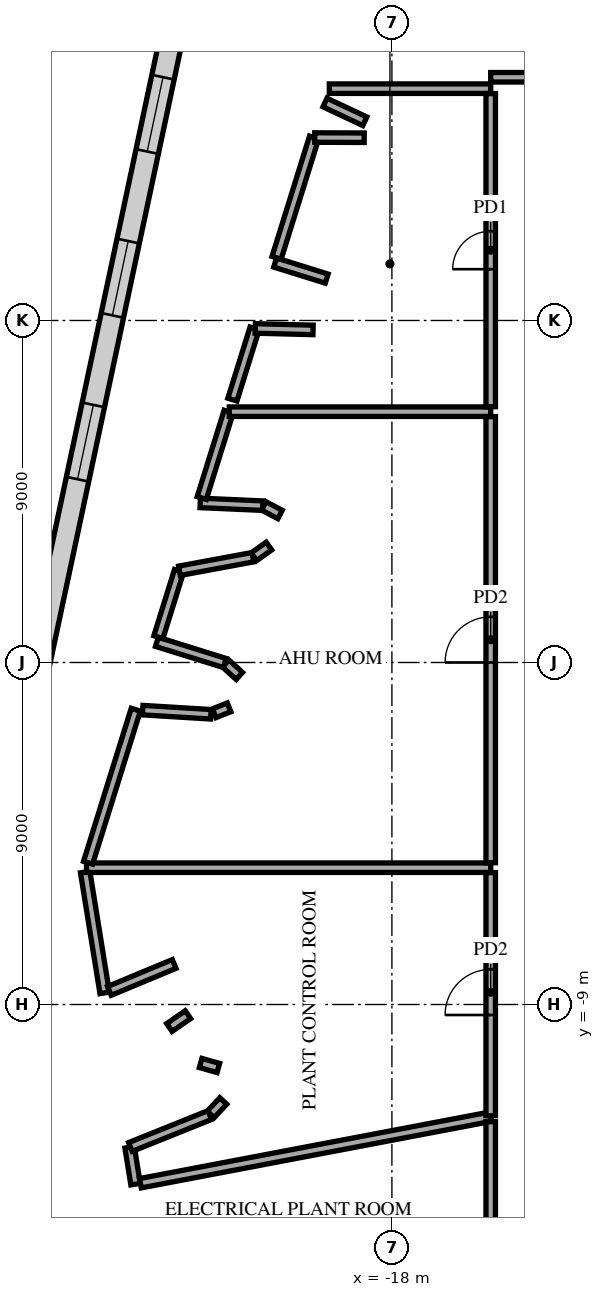
"""IFC4 building model, lengths in metres.
Left out: names, types, materials, properties, quantities, classifications, styles, units other than length and angle.
Written with IfcOpenShell. Run it as: python <this file> out.ifc"""

import sys

from ifc_helpers import new_model, si_unit, direction, frame, frame_2d, origin, place, context, subcontext, project, spatial, rectangle, extrude, element, fill, save


model = new_model("IFC4")
c1 = context("Model", 3, precision=1e-05, world=origin(), true_north=direction((0.0, 1.0)))
c2 = subcontext(c1, "Body", "Model", "MODEL_VIEW")
j1 = project(units=[si_unit("LENGTHUNIT", "METRE"), si_unit("PLANEANGLEUNIT", "RADIAN")], contexts=[c1])
p1 = place(None, origin())
s1 = spatial("IfcSite", under=j1, at=p1, CompositionType="ELEMENT")
p2 = place(p1, origin())
s2 = spatial("IfcBuilding", under=s1, at=p2, CompositionType="ELEMENT")
p3 = place(p2, frame((0.0, 0.0, 344.5)))
s3 = spatial("IfcBuildingStorey", under=s2, at=p3, CompositionType="ELEMENT", Elevation=344.5)
p4 = place(p3, frame((-24.902, -12.758, 0.0), z_axis=(0.0, 0.0, 1.0), x_axis=(0.159396618474, -0.987214626117, 0.0)))
e1 = element("IfcWall", 1, at=p4, inside=s3, PredefinedType="PARTITIONING", context=c2, shape_type="SweptSolid", body=[
    extrude(rectangle(XDim=0.982, YDim=0.25, at=frame_2d((0.491, 0.0))), origin(), (0.0, 0.0, 1.0), 5.3),
])
p5 = place(p3, frame((-24.881, -12.75, 0.0), z_axis=(0.0, 0.0, 1.0), x_axis=(0.927757135896, 0.373184534505, 0.0)))
e2 = element("IfcWall", 2, at=p5, inside=s3, PredefinedType="PARTITIONING", context=c2, shape_type="SweptSolid", body=[
    extrude(rectangle(XDim=2.252, YDim=0.25, at=frame_2d((1.126, 0.0))), origin(), (0.0, 0.0, 1.0), 5.3),
])
p6 = place(p3, frame((-24.617, -13.703, 0.0), z_axis=(0.0, 0.0, 1.0), x_axis=(0.982426598923, 0.186649344301, 0.0)))
e3 = element("IfcWall", 3, at=p6, inside=s3, PredefinedType="PARTITIONING", context=c2, shape_type="SweptSolid", body=[
    extrude(rectangle(XDim=9.382, YDim=0.25, at=frame_2d((4.691, 0.0))), origin(), (0.0, 0.0, 1.0), 4.466),
])
p7 = place(p3, frame((-15.4, -15.27, 0.0), z_axis=(0.0, 0.0, 1.0), x_axis=(0.0, 1.0, 0.0)))
e4 = element("IfcWall", 4, at=p7, inside=s3, PredefinedType="PARTITIONING", context=c2, shape_type="SweptSolid", body=[
    extrude(rectangle(XDim=3.186, YDim=0.25, at=frame_2d((1.593, 0.0))), origin(), (0.0, 0.0, 1.0), 4.56),
])
p8 = place(p3, frame((-22.768, -11.893, 0.0), z_axis=(0.0, 0.0, 1.0), x_axis=(0.683252613889, 0.730182077029, 0.0)))
e5 = element("IfcWall", 5, at=p8, inside=s3, PredefinedType="PARTITIONING", context=c2, shape_type="SweptSolid", body=[
    extrude(rectangle(XDim=0.484, YDim=0.25, at=frame_2d((0.242, 0.0))), origin(), (0.0, 0.0, 1.0), 5.3),
])
p9 = place(p3, frame((-23.033, -10.539, 0.0), z_axis=(0.0, 0.0, 1.0), x_axis=(0.961998655506, -0.273054182911, 0.0)))
e6 = element("IfcWall", 6, at=p9, inside=s3, PredefinedType="PARTITIONING", context=c2, shape_type="SweptSolid", body=[
    extrude(rectangle(XDim=0.484, YDim=0.25, at=frame_2d((0.242, 0.0))), origin(), (0.0, 0.0, 1.0), 5.3),
])
p10 = place(p3, frame((-23.855, -9.605, 0.0), z_axis=(0.0, 0.0, 1.0), x_axis=(0.822355310526, 0.568974290499, 0.0)))
e7 = element("IfcWall", 7, at=p10, inside=s3, PredefinedType="PARTITIONING", context=c2, shape_type="SweptSolid", body=[
    extrude(rectangle(XDim=0.593, YDim=0.25, at=frame_2d((0.296, 0.0))), origin(), (0.0, 0.0, 1.0), 5.3),
])
p11 = place(p3, frame((-26.071, -5.515, 0.0), z_axis=(0.0, 0.0, 1.0), x_axis=(0.159306339917, -0.987229198344, 0.0)))
e8 = element("IfcWall", 8, at=p11, inside=s3, PredefinedType="PARTITIONING", context=c2, shape_type="SweptSolid", body=[
    extrude(rectangle(XDim=3.22, YDim=0.25, at=frame_2d((1.61, 0.0))), origin(), (0.0, 0.0, 1.0), 5.3),
])
p12 = place(p3, frame((-25.434, -8.643, 0.0), z_axis=(0.0, 0.0, 1.0), x_axis=(0.923198131706, 0.3843243547, 0.0)))
e9 = element("IfcWall", 9, at=p12, inside=s3, PredefinedType="PARTITIONING", context=c2, shape_type="SweptSolid", body=[
    extrude(rectangle(XDim=1.847, YDim=0.25, at=frame_2d((0.923, 0.0))), origin(), (0.0, 0.0, 1.0), 5.3),
])
p13 = place(p3, frame((-26.035, -5.4, 0.0), z_axis=(0.0, 0.0, 1.0), x_axis=(1.0, 0.0, 0.0)))
e10 = element("IfcWall", 10, at=p13, inside=s3, PredefinedType="PARTITIONING", context=c2, shape_type="SweptSolid", body=[
    extrude(rectangle(XDim=10.635, YDim=0.25, at=frame_2d((5.317, 0.0))), origin(), (0.0, 0.0, 1.0), 4.466),
])
p14 = place(p3, frame((-15.4, -11.925, 0.0), z_axis=(0.0, 0.0, 1.0), x_axis=(0.0, 1.0, 0.0)))
e11 = element("IfcWall", 11, at=p14, inside=s3, PredefinedType="PARTITIONING", context=c2, shape_type="SweptSolid", body=[
    extrude(rectangle(XDim=6.395, YDim=0.25, at=frame_2d((3.198, 0.0))), origin(), (0.0, 0.0, 1.0), 5.3),
])
p15 = place(p14, frame((2.649, 0.0, 0.0)))
e12 = element("IfcOpeningElement", 12, at=p15, cuts=e11, PredefinedType="OPENING", context=c2, shape_type="SweptSolid", body=[
    extrude(rectangle(XDim=1.2, YDim=2.1, at=frame_2d((0.6, 1.05))), frame((0.0, 0.135, 0.0), z_axis=(0.0, -1.0, 0.0), x_axis=(1.0, 0.0, 0.0)), (0.0, 0.0, 1.0), 0.27),
])
p16 = place(p3, frame((-22.675, -1.335, 0.0), z_axis=(0.0, 0.0, 1.0), x_axis=(0.930306402857, 0.366783310421, 0.0)))
e13 = element("IfcWall", 13, at=p16, inside=s3, PredefinedType="PARTITIONING", context=c2, shape_type="SweptSolid", body=[
    extrude(rectangle(XDim=0.421, YDim=0.25, at=frame_2d((0.21, 0.0))), origin(), (0.0, 0.0, 1.0), 5.3),
])
p17 = place(p3, frame((-24.558, -1.254, 0.0), z_axis=(0.0, 0.0, 1.0), x_axis=(0.998158301025, -0.060663053781, 0.0)))
e14 = element("IfcWall", 14, at=p17, inside=s3, PredefinedType="PARTITIONING", context=c2, shape_type="SweptSolid", body=[
    extrude(rectangle(XDim=1.799, YDim=0.25, at=frame_2d((0.899, 0.0))), origin(), (0.0, 0.0, 1.0), 5.3),
])
p18 = place(p3, frame((-25.994, -5.27, 0.0), z_axis=(0.0, 0.0, 1.0), x_axis=(0.297483983817, 0.954726808764, 0.0)))
e15 = element("IfcWall", 15, at=p18, inside=s3, PredefinedType="PARTITIONING", context=c2, shape_type="SweptSolid", body=[
    extrude(rectangle(XDim=4.218, YDim=0.25, at=frame_2d((2.109, 0.0))), origin(), (0.0, 0.0, 1.0), 5.3),
])
p19 = place(p3, frame((-22.371, -0.028, 0.0), z_axis=(0.0, 0.0, 1.0), x_axis=(0.739391732654, -0.673275475331, 0.0)))
e16 = element("IfcWall", 16, at=p19, inside=s3, PredefinedType="PARTITIONING", context=c2, shape_type="SweptSolid", body=[
    extrude(rectangle(XDim=0.484, YDim=0.25, at=frame_2d((0.242, 0.0))), origin(), (0.0, 0.0, 1.0), 5.3),
])
p20 = place(p3, frame((-24.183, 0.543, 0.0), z_axis=(0.0, 0.0, 1.0), x_axis=(0.954723438936, -0.29749479852, 0.0)))
e17 = element("IfcWall", 17, at=p20, inside=s3, PredefinedType="PARTITIONING", context=c2, shape_type="SweptSolid", body=[
    extrude(rectangle(XDim=1.871, YDim=0.25, at=frame_2d((0.936, 0.0))), origin(), (0.0, 0.0, 1.0), 5.3),
])
p21 = place(p3, frame((-24.144, 0.667, 0.0), z_axis=(0.0, 0.0, 1.0), x_axis=(0.297483511213, 0.954726956023, 0.0)))
e18 = element("IfcWall", 18, at=p21, inside=s3, PredefinedType="PARTITIONING", context=c2, shape_type="SweptSolid", body=[
    extrude(rectangle(XDim=1.827, YDim=0.25, at=frame_2d((0.914, 0.0))), origin(), (0.0, 0.0, 1.0), 5.3),
])
p22 = place(p3, frame((-23.59, 2.413, 0.0), z_axis=(0.0, 0.0, 1.0), x_axis=(0.983248230193, 0.182271549681, 0.0)))
e19 = element("IfcWall", 19, at=p22, inside=s3, PredefinedType="PARTITIONING", context=c2, shape_type="SweptSolid", body=[
    extrude(rectangle(XDim=1.966, YDim=0.25, at=frame_2d((0.983, 0.0))), origin(), (0.0, 0.0, 1.0), 5.3),
])
p23 = place(p3, frame((-21.63, 2.783, 0.0), z_axis=(0.0, 0.0, 1.0), x_axis=(0.81400616729, 0.580856229728, 0.0)))
e20 = element("IfcWall", 20, at=p23, inside=s3, PredefinedType="PARTITIONING", context=c2, shape_type="SweptSolid", body=[
    extrude(rectangle(XDim=0.484, YDim=0.25, at=frame_2d((0.242, 0.0))), origin(), (0.0, 0.0, 1.0), 5.3),
])
p24 = place(p3, frame((-21.371, 4.119, 0.0), z_axis=(0.0, 0.0, 1.0), x_axis=(0.886728784224, -0.462290020688, 0.0)))
e21 = element("IfcWall", 21, at=p24, inside=s3, PredefinedType="PARTITIONING", context=c2, shape_type="SweptSolid", body=[
    extrude(rectangle(XDim=0.484, YDim=0.25, at=frame_2d((0.242, 0.0))), origin(), (0.0, 0.0, 1.0), 5.3),
])
p25 = place(p3, frame((-23.044, 4.199, 0.0), z_axis=(0.0, 0.0, 1.0), x_axis=(0.999022559739, -0.04420322536, 0.0)))
e22 = element("IfcWall", 22, at=p25, inside=s3, PredefinedType="PARTITIONING", context=c2, shape_type="SweptSolid", body=[
    extrude(rectangle(XDim=1.646, YDim=0.25, at=frame_2d((0.823, 0.0))), origin(), (0.0, 0.0, 1.0), 5.3),
])
p26 = place(p3, frame((-23.004, 4.328, 0.0), z_axis=(0.0, 0.0, 1.0), x_axis=(0.297486364479, 0.954726066968, 0.0)))
e23 = element("IfcWall", 23, at=p26, inside=s3, PredefinedType="PARTITIONING", context=c2, shape_type="SweptSolid", body=[
    extrude(rectangle(XDim=2.38, YDim=0.25, at=frame_2d((1.19, 0.0))), origin(), (0.0, 0.0, 1.0), 5.3),
])
p27 = place(p3, frame((-22.279, 6.6, 0.0), z_axis=(0.0, 0.0, 1.0), x_axis=(1.0, 0.0, 0.0)))
e24 = element("IfcWall", 24, at=p27, inside=s3, PredefinedType="PARTITIONING", context=c2, shape_type="SweptSolid", body=[
    extrude(rectangle(XDim=6.879, YDim=0.25, at=frame_2d((3.439, 0.0))), origin(), (0.0, 0.0, 1.0), 4.466),
])
p28 = place(p3, frame((-15.4, -5.27, 0.0), z_axis=(0.0, 0.0, 1.0), x_axis=(0.0, 1.0, 0.0)))
e25 = element("IfcWall", 25, at=p28, inside=s3, PredefinedType="PARTITIONING", context=c2, shape_type="SweptSolid", body=[
    extrude(rectangle(XDim=11.74, YDim=0.25, at=frame_2d((5.87, 0.0))), origin(), (0.0, 0.0, 1.0), 5.3),
])
p29 = place(p28, frame((5.27, 0.0, 0.0)))
e26 = element("IfcOpeningElement", 26, at=p29, cuts=e25, PredefinedType="OPENING", context=c2, shape_type="SweptSolid", body=[
    extrude(rectangle(XDim=1.2, YDim=2.1, at=frame_2d((0.6, 1.05))), frame((0.0, 0.135, 0.0), z_axis=(0.0, -1.0, 0.0), x_axis=(1.0, 0.0, 0.0)), (0.0, 0.0, 1.0), 0.27),
])
p30 = place(p3, frame((-22.197, 6.917, 0.0), z_axis=(0.0, 0.0, 1.0), x_axis=(0.297510044544, 0.954718688094, 0.0)))
e27 = element("IfcWall", 27, at=p30, inside=s3, PredefinedType="PARTITIONING", context=c2, shape_type="SweptSolid", body=[
    extrude(rectangle(XDim=1.963, YDim=0.25, at=frame_2d((0.981, 0.0))), origin(), (0.0, 0.0, 1.0), 5.3),
])
p31 = place(p3, frame((-21.595, 8.79, 0.0), z_axis=(0.0, 0.0, 1.0), x_axis=(0.999678354561, -0.025361140016, 0.0)))
e28 = element("IfcWall", 28, at=p31, inside=s3, PredefinedType="PARTITIONING", context=c2, shape_type="SweptSolid", body=[
    extrude(rectangle(XDim=1.521, YDim=0.25, at=frame_2d((0.76, 0.0))), origin(), (0.0, 0.0, 1.0), 5.3),
])
p32 = place(p3, frame((-21.073, 10.524, 0.0), z_axis=(0.0, 0.0, 1.0), x_axis=(0.954718077895, -0.297512002683, 0.0)))
e29 = element("IfcWall", 29, at=p32, inside=s3, PredefinedType="PARTITIONING", context=c2, shape_type="SweptSolid", body=[
    extrude(rectangle(XDim=1.421, YDim=0.25, at=frame_2d((0.711, 0.0))), origin(), (0.0, 0.0, 1.0), 5.3),
])
p33 = place(p3, frame((-21.034, 10.648, 0.0), z_axis=(0.0, 0.0, 1.0), x_axis=(0.297457376407, 0.954735098978, 0.0)))
e30 = element("IfcWall", 30, at=p33, inside=s3, PredefinedType="PARTITIONING", context=c2, shape_type="SweptSolid", body=[
    extrude(rectangle(XDim=3.316, YDim=0.25, at=frame_2d((1.658, 0.0))), origin(), (0.0, 0.0, 1.0), 5.3),
])
p34 = place(p3, frame((-20.031, 13.814, 0.0), z_axis=(0.0, 0.0, 1.0), x_axis=(0.999992965307, -0.003750911348, 0.0)))
e31 = element("IfcWall", 31, at=p34, inside=s3, PredefinedType="PARTITIONING", context=c2, shape_type="SweptSolid", body=[
    extrude(rectangle(XDim=1.302, YDim=0.25, at=frame_2d((0.651, 0.0))), origin(), (0.0, 0.0, 1.0), 5.3),
])
p35 = place(p3, frame((-19.76, 14.736, 0.0), z_axis=(0.0, 0.0, 1.0), x_axis=(0.904675376638, -0.426101470198, 0.0)))
e32 = element("IfcWall", 32, at=p35, inside=s3, PredefinedType="PARTITIONING", context=c2, shape_type="SweptSolid", body=[
    extrude(rectangle(XDim=1.158, YDim=0.25, at=frame_2d((0.579, 0.0))), origin(), (0.0, 0.0, 1.0), 5.3),
])
p36 = place(p3, frame((-19.647, 15.1, 0.0), z_axis=(0.0, 0.0, 1.0), x_axis=(1.0, 0.0, 0.0)))
e33 = element("IfcWall", 33, at=p36, inside=s3, PredefinedType="PARTITIONING", context=c2, shape_type="SweptSolid", body=[
    extrude(rectangle(XDim=4.247, YDim=0.25, at=frame_2d((2.124, 0.0))), origin(), (0.0, 0.0, 1.0), 5.3),
])
p37 = place(p3, frame((-15.4, 6.73, 0.0), z_axis=(0.0, 0.0, 1.0), x_axis=(0.0, 1.0, 0.0)))
e34 = element("IfcWall", 34, at=p37, inside=s3, PredefinedType="PARTITIONING", context=c2, shape_type="SweptSolid", body=[
    extrude(rectangle(XDim=8.24, YDim=0.25, at=frame_2d((4.12, 0.0))), origin(), (0.0, 0.0, 1.0), 4.466),
])
p38 = place(p37, frame((3.62, 0.0, 0.0)))
e35 = element("IfcOpeningElement", 35, at=p38, cuts=e34, PredefinedType="OPENING", context=c2, shape_type="SweptSolid", body=[
    extrude(rectangle(XDim=1.0, YDim=2.1, at=frame_2d((0.5, 1.05))), frame((0.0, 0.135, 0.0), z_axis=(0.0, -1.0, 0.0), x_axis=(1.0, 0.0, 0.0)), (0.0, 0.0, 1.0), 0.27),
])
p39 = place(p3, frame((-15.4, 15.4, 0.0), z_axis=(0.0, 0.0, 1.0), x_axis=(1.0, 0.0, 0.0)))
e36 = element("IfcWall", 36, at=p39, inside=s3, PredefinedType="PARTITIONING", context=c2, shape_type="SweptSolid", body=[
    extrude(rectangle(XDim=3.97, YDim=0.25, at=frame_2d((1.985, 0.0))), origin(), (0.0, 0.0, 1.0), 4.466),
])
p40 = place(p3, frame((-21.023, 29.516, 0.0), z_axis=(0.0, 0.0, 1.0), x_axis=(-0.207911686457, -0.978147601661, 0.0)))
e37 = element("IfcWall", 37, at=p40, inside=s3, PredefinedType="STANDARD", context=c2, shape_type="SweptSolid", body=[
    extrude(rectangle(XDim=48.49, YDim=0.6, at=frame_2d((24.245, 0.0))), origin(), (0.0, 0.0, 1.0), 5.3),
])
p41 = place(p40, frame((1.204, 0.0, 0.6)))
e38 = element("IfcOpeningElement", 38, at=p41, cuts=e37, PredefinedType="OPENING", context=c2, shape_type="SweptSolid", body=[
    extrude(rectangle(XDim=2.0, YDim=4.25, at=frame_2d((1.0, 2.125))), frame((0.0, 0.31, 0.0), z_axis=(0.0, -1.0, 0.0), x_axis=(1.0, 0.0, 0.0)), (0.0, 0.0, 1.0), 0.62),
])
p42 = place(p40, frame((5.612, 0.0, 0.6)))
e39 = element("IfcOpeningElement", 39, at=p42, cuts=e37, PredefinedType="OPENING", context=c2, shape_type="SweptSolid", body=[
    extrude(rectangle(XDim=2.0, YDim=4.25, at=frame_2d((1.0, 2.125))), frame((0.0, 0.31, 0.0), z_axis=(0.0, -1.0, 0.0), x_axis=(1.0, 0.0, 0.0)), (0.0, 0.0, 1.0), 0.62),
])
p43 = place(p40, frame((10.021, 0.0, 0.6)))
e40 = element("IfcOpeningElement", 40, at=p43, cuts=e37, PredefinedType="OPENING", context=c2, shape_type="SweptSolid", body=[
    extrude(rectangle(XDim=2.0, YDim=4.25, at=frame_2d((1.0, 2.125))), frame((0.0, 0.31, 0.0), z_axis=(0.0, -1.0, 0.0), x_axis=(1.0, 0.0, 0.0)), (0.0, 0.0, 1.0), 0.62),
])
p44 = place(p40, frame((14.428, 0.0, 0.6)))
e41 = element("IfcOpeningElement", 41, at=p44, cuts=e37, PredefinedType="OPENING", context=c2, shape_type="SweptSolid", body=[
    extrude(rectangle(XDim=2.0, YDim=4.25, at=frame_2d((1.0, 2.125))), frame((0.0, 0.31, 0.0), z_axis=(0.0, -1.0, 0.0), x_axis=(1.0, 0.0, 0.0)), (0.0, 0.0, 1.0), 0.62),
])
p45 = place(p40, frame((18.837, 0.0, 0.6)))
e42 = element("IfcOpeningElement", 42, at=p45, cuts=e37, PredefinedType="OPENING", context=c2, shape_type="SweptSolid", body=[
    extrude(rectangle(XDim=2.0, YDim=4.25, at=frame_2d((1.0, 2.125))), frame((0.0, 0.31, 0.0), z_axis=(0.0, -1.0, 0.0), x_axis=(1.0, 0.0, 0.0)), (0.0, 0.0, 1.0), 0.62),
])
p46 = place(p40, frame((23.245, 0.0, 0.6)))
e43 = element("IfcOpeningElement", 43, at=p46, cuts=e37, PredefinedType="OPENING", context=c2, shape_type="SweptSolid", body=[
    extrude(rectangle(XDim=2.0, YDim=4.25, at=frame_2d((1.0, 2.125))), frame((0.0, 0.31, 0.0), z_axis=(0.0, -1.0, 0.0), x_axis=(1.0, 0.0, 0.0)), (0.0, 0.0, 1.0), 0.62),
])
p47 = place(p40, frame((32.061, 0.0, 0.6)))
e44 = element("IfcOpeningElement", 44, at=p47, cuts=e37, PredefinedType="OPENING", context=c2, shape_type="SweptSolid", body=[
    extrude(rectangle(XDim=2.0, YDim=4.25, at=frame_2d((1.0, 2.125))), frame((0.0, 0.31, 0.0), z_axis=(0.0, -1.0, 0.0), x_axis=(1.0, 0.0, 0.0)), (0.0, 0.0, 1.0), 0.62),
])
p48 = place(p40, frame((36.469, 0.0, 0.6)))
e45 = element("IfcOpeningElement", 45, at=p48, cuts=e37, PredefinedType="OPENING", context=c2, shape_type="SweptSolid", body=[
    extrude(rectangle(XDim=2.0, YDim=4.25, at=frame_2d((1.0, 2.125))), frame((0.0, 0.31, 0.0), z_axis=(0.0, -1.0, 0.0), x_axis=(1.0, 0.0, 0.0)), (0.0, 0.0, 1.0), 0.62),
])
p49 = place(p40, frame((40.877, 0.0, 0.6)))
e46 = element("IfcOpeningElement", 46, at=p49, cuts=e37, PredefinedType="OPENING", context=c2, shape_type="SweptSolid", body=[
    extrude(rectangle(XDim=2.0, YDim=4.25, at=frame_2d((1.0, 2.125))), frame((0.0, 0.31, 0.0), z_axis=(0.0, -1.0, 0.0), x_axis=(1.0, 0.0, 0.0)), (0.0, 0.0, 1.0), 0.62),
])
p50 = place(p40, frame((45.285, 0.0, 0.6)))
e47 = element("IfcOpeningElement", 47, at=p50, cuts=e37, PredefinedType="OPENING", context=c2, shape_type="SweptSolid", body=[
    extrude(rectangle(XDim=2.0, YDim=4.25, at=frame_2d((1.0, 2.125))), frame((0.0, 0.31, 0.0), z_axis=(0.0, -1.0, 0.0), x_axis=(1.0, 0.0, 0.0)), (0.0, 0.0, 1.0), 0.62),
])
p51 = place(p15, origin())
e48 = element("IfcDoor", 48, at=p51, inside=s3, OperationType="SINGLE_SWING_RIGHT", PredefinedType="DOOR", context=c2, shape_type="SweptSolid", body=[
    extrude(rectangle(XDim=1.2, YDim=2.1, at=frame_2d((0.6, 1.05))), frame((0.0, 0.025, 0.0), z_axis=(0.0, -1.0, 0.0), x_axis=(1.0, 0.0, 0.0)), (0.0, 0.0, 1.0), 0.05),
])
fill(e12, e48)
p52 = place(p29, origin())
e49 = element("IfcDoor", 49, at=p52, inside=s3, OperationType="SINGLE_SWING_LEFT", PredefinedType="DOOR", context=c2, shape_type="SweptSolid", body=[
    extrude(rectangle(XDim=1.2, YDim=2.1, at=frame_2d((0.6, 1.05))), frame((0.0, 0.025, 0.0), z_axis=(0.0, -1.0, 0.0), x_axis=(1.0, 0.0, 0.0)), (0.0, 0.0, 1.0), 0.05),
])
fill(e26, e49)
p53 = place(p38, origin())
e50 = element("IfcDoor", 50, at=p53, inside=s3, OperationType="SINGLE_SWING_RIGHT", PredefinedType="DOOR", context=c2, shape_type="SweptSolid", body=[
    extrude(rectangle(XDim=1.0, YDim=2.1, at=frame_2d((0.5, 1.05))), frame((0.0, 0.025, 0.0), z_axis=(0.0, -1.0, 0.0), x_axis=(1.0, 0.0, 0.0)), (0.0, 0.0, 1.0), 0.05),
])
fill(e35, e50)
p54 = place(p44, origin())
e51 = element("IfcWindow", 51, at=p54, inside=s3, PartitioningType="SINGLE_PANEL", PredefinedType="USERDEFINED", context=c2, shape_type="SweptSolid", body=[
    extrude(rectangle(XDim=2.0, YDim=4.25, at=frame_2d((1.0, 2.125))), frame((0.0, 0.03, 0.0), z_axis=(0.0, -1.0, 0.0), x_axis=(1.0, 0.0, 0.0)), (0.0, 0.0, 1.0), 0.06),
])
fill(e41, e51)
p55 = place(p45, origin())
e52 = element("IfcWindow", 52, at=p55, inside=s3, PartitioningType="SINGLE_PANEL", PredefinedType="USERDEFINED", context=c2, shape_type="SweptSolid", body=[
    extrude(rectangle(XDim=2.0, YDim=4.25, at=frame_2d((1.0, 2.125))), frame((0.0, 0.03, 0.0), z_axis=(0.0, -1.0, 0.0), x_axis=(1.0, 0.0, 0.0)), (0.0, 0.0, 1.0), 0.06),
])
fill(e42, e52)
p56 = place(p46, origin())
e53 = element("IfcWindow", 53, at=p56, inside=s3, PartitioningType="SINGLE_PANEL", PredefinedType="USERDEFINED", context=c2, shape_type="SweptSolid", body=[
    extrude(rectangle(XDim=2.0, YDim=4.25, at=frame_2d((1.0, 2.125))), frame((0.0, 0.03, 0.0), z_axis=(0.0, -1.0, 0.0), x_axis=(1.0, 0.0, 0.0)), (0.0, 0.0, 1.0), 0.06),
])
fill(e43, e53)
save(model, sys.argv[1])
